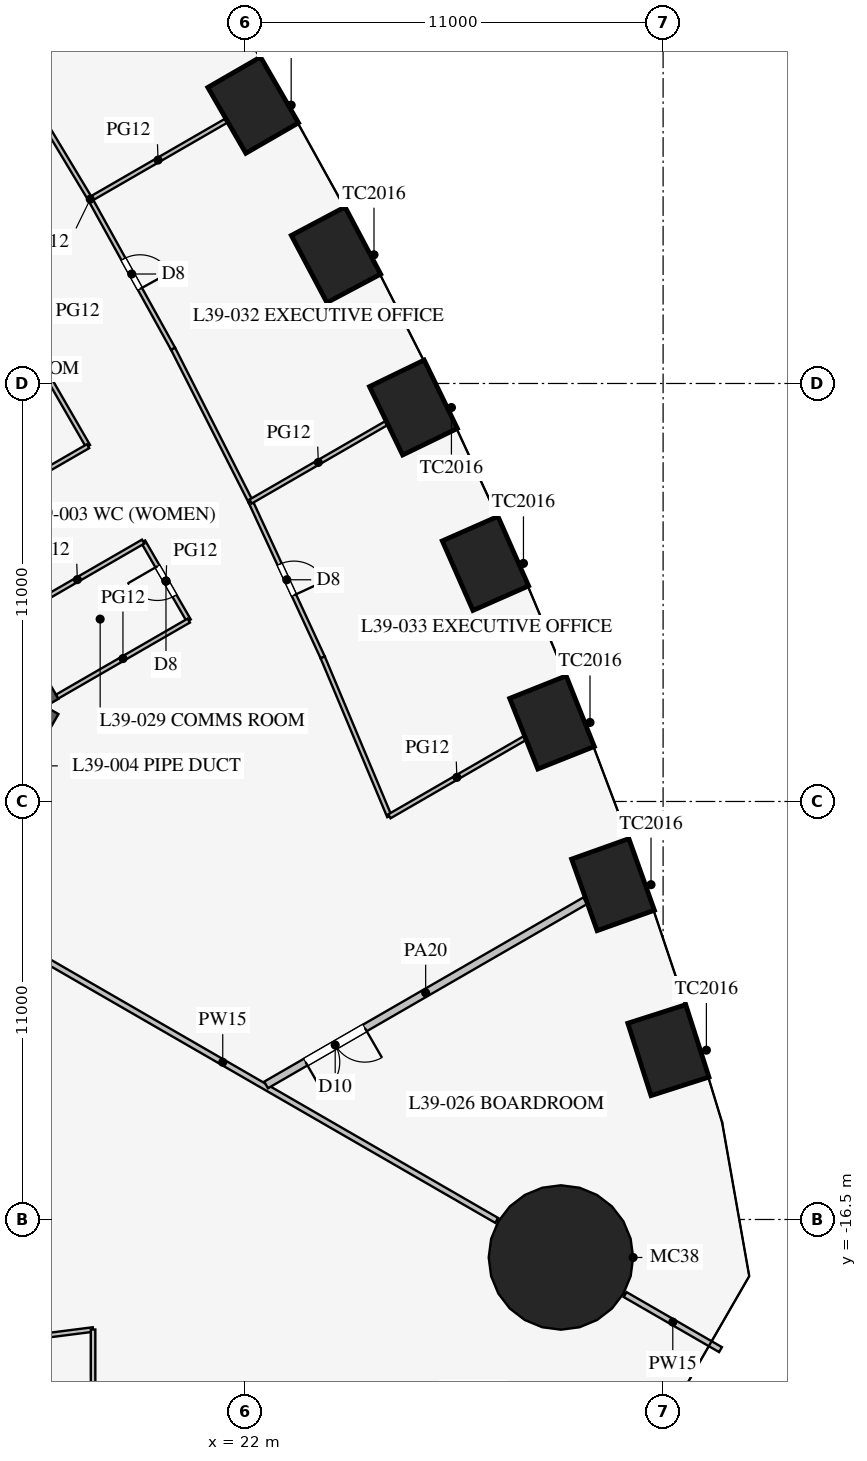
"""IFC4 building model, lengths in metres.
Left out: names, types, materials, properties, quantities, classifications, styles, units other than length and angle.
Written with IfcOpenShell. Run it as: python <this file> out.ifc"""

import sys

from ifc_helpers import new_model, si_unit, direction, frame, frame_2d, origin, origin_2d, place, context, subcontext, project, spatial, rectangle, circle, extrude, element, fill, save


model = new_model("IFC4")
c1 = context("Model", 3, precision=1e-05, world=origin(), true_north=direction((0.0, 1.0)))
c2 = subcontext(c1, "Body", "Model", "MODEL_VIEW")
j1 = project(units=[si_unit("LENGTHUNIT", "METRE"), si_unit("PLANEANGLEUNIT", "RADIAN")], contexts=[c1])
p1 = place(None, origin())
s1 = spatial("IfcSite", under=j1, at=p1, CompositionType="ELEMENT")
p2 = place(p1, origin())
s2 = spatial("IfcBuilding", under=s1, at=p2, CompositionType="ELEMENT")
p3 = place(p2, frame((0.0, 0.0, 170.3)))
s3 = spatial("IfcBuildingStorey", under=s2, at=p3, CompositionType="ELEMENT", Elevation=170.3)
for number, where, z_axis, x_axis in (
    (1, (33.139, -12.044, 0.0), (0.0, 0.0, 1.0), (-0.305, 0.952, 0.0)),
    (2, (31.682, -7.689, 0.0), (0.0, 0.0, 1.0), (-0.336, 0.942, 0.0)),
    (3, (30.077, -3.42, 0.0), (0.0, 0.0, 1.0), (-0.37, 0.929, 0.0)),
    (4, (28.325, 0.765, 0.0), (0.0, 0.0, 1.0), (-0.403, 0.915, 0.0)),
    (5, (26.43, 4.867, 0.0), (0.0, 0.0, 1.0), (-0.436, 0.9, 0.0)),
    (6, (24.393, 8.887, 0.0), (0.0, 0.0, 1.0), (-0.468, 0.883, 0.0)),
    (7, (22.213, 12.825, 0.0), (0.0, 0.0, 1.0), (-0.5, 0.866, 0.0)),
):
    element("IfcColumn", number, at=place(p3, frame(where, z_axis=z_axis, x_axis=x_axis)), inside=s3, PredefinedType="COLUMN", context=c2, shape_type="SweptSolid", body=[
        extrude(rectangle(XDim=2.0, YDim=1.6, at=origin_2d()), origin(), (0.0, 0.0, 1.0), 4.2),
    ])
p4 = place(p3, frame((30.311, -17.5, 0.0), z_axis=(0.0, 0.0, 1.0), x_axis=(1.0, 0.0, 0.0)))
e8 = element("IfcColumn", 8, at=p4, inside=s3, PredefinedType="COLUMN", context=c2, shape_type="SweptSolid", body=[
    extrude(circle(Radius=1.9, at=origin_2d()), origin(), (0.0, 0.0, 1.0), 4.2),
])
p5 = place(p3, frame((10.97, -13.0, 0.0), z_axis=(0.0, 0.0, 1.0), x_axis=(0.499995765644, 0.866027848477, 0.0)))
e9 = element("IfcWall", 9, at=p5, inside=s3, PredefinedType="SHEAR", context=c2, shape_type="SweptSolid", body=[
    extrude(rectangle(XDim=11.547, YDim=0.8, at=frame_2d((5.773, 0.0))), origin(), (0.0, 0.0, 1.0), 4.2),
])
p6 = place(p3, frame((16.743, -3.0, 0.0), z_axis=(0.0, 0.0, 1.0), x_axis=(-0.500002442456, 0.866023993627, 0.0)))
e10 = element("IfcWall", 10, at=p6, inside=s3, PredefinedType="SHEAR", context=c2, shape_type="SweptSolid", body=[
    extrude(rectangle(XDim=21.939, YDim=0.8, at=frame_2d((10.97, 0.0))), origin(), (0.0, 0.0, 1.0), 4.2),
])
p7 = place(p6, frame((17.27, 0.0, 0.0)))
e11 = element("IfcOpeningElement", 11, at=p7, cuts=e10, PredefinedType="OPENING", context=c2, shape_type="SweptSolid", body=[
    extrude(rectangle(XDim=1.2, YDim=2.1, at=frame_2d((0.6, 1.05))), frame((0.0, 0.41, 0.0), z_axis=(0.0, -1.0, 0.0), x_axis=(1.0, 0.0, 0.0)), (0.0, 0.0, 1.0), 0.82),
])
p8 = place(p6, frame((3.47, 0.0, 0.0)))
e12 = element("IfcOpeningElement", 12, at=p8, cuts=e10, PredefinedType="OPENING", context=c2, shape_type="SweptSolid", body=[
    extrude(rectangle(XDim=1.2, YDim=2.1, at=frame_2d((0.6, 1.05))), frame((0.0, 0.41, 0.0), z_axis=(0.0, -1.0, 0.0), x_axis=(1.0, 0.0, 0.0)), (0.0, 0.0, 1.0), 0.82),
])
p9 = place(p3, frame((14.203, -8.2, 0.0), z_axis=(0.0, 0.0, 1.0), x_axis=(0.866024668836, -0.500001272966, 0.0)))
e13 = element("IfcWall", 13, at=p9, inside=s3, PredefinedType="PARTITIONING", context=c2, shape_type="SweptSolid", body=[
    extrude(rectangle(XDim=16.65, YDim=0.15, at=frame_2d((8.325, 0.0))), origin(), (0.0, 0.0, 1.0), 2.3),
])
p10 = place(p3, frame((32.0, -18.475, 0.0), z_axis=(0.0, 0.0, 1.0), x_axis=(0.866042548026, -0.499970304126, 0.0)))
e14 = element("IfcWall", 14, at=p10, inside=s3, PredefinedType="PARTITIONING", context=c2, shape_type="SweptSolid", body=[
    extrude(rectangle(XDim=2.899, YDim=0.15, at=frame_2d((1.45, 0.0))), origin(), (0.0, 0.0, 1.0), 2.3),
])
p11 = place(p3, frame((13.5, -19.968, 0.0), z_axis=(0.0, 0.0, 1.0), x_axis=(0.992010652594, 0.12615413247, 0.0)))
e15 = element("IfcWall", 15, at=p11, inside=s3, PredefinedType="PARTITIONING", context=c2, shape_type="SweptSolid", body=[
    extrude(rectangle(XDim=4.536, YDim=0.12, at=frame_2d((2.268, 0.0))), origin(), (0.0, 0.0, 1.0), 2.9),
])
p12 = place(p11, frame((1.8, 0.0, 0.15)))
e16 = element("IfcOpeningElement", 16, at=p12, cuts=e15, PredefinedType="OPENING", context=c2, shape_type="SweptSolid", body=[
    extrude(rectangle(XDim=0.9, YDim=2.1, at=frame_2d((0.45, 1.05))), frame((0.0, 0.07, 0.0), z_axis=(0.0, -1.0, 0.0), x_axis=(1.0, 0.0, 0.0)), (0.0, 0.0, 1.0), 0.14),
])
p13 = place(p3, frame((18.0, -19.396, 0.0), z_axis=(0.0, 0.0, 1.0), x_axis=(0.0, -1.0, 0.0)))
e17 = element("IfcWall", 17, at=p13, inside=s3, PredefinedType="PARTITIONING", context=c2, shape_type="SweptSolid", body=[
    extrude(rectangle(XDim=4.103, YDim=0.12, at=frame_2d((2.052, 0.0))), origin(), (0.0, 0.0, 1.0), 2.4),
])
p14 = place(p3, frame((20.519, -0.74, 0.0), z_axis=(0.0, 0.0, 1.0), x_axis=(-0.499957262057, 0.866050077142, 0.0)))
e18 = element("IfcWall", 18, at=p14, inside=s3, PredefinedType="PARTITIONING", context=c2, shape_type="SweptSolid", body=[
    extrude(rectangle(XDim=2.4, YDim=0.12, at=frame_2d((1.2, 0.0))), origin(), (0.0, 0.0, 1.0), 2.9),
])
p15 = place(p14, frame((0.75, 0.0, 0.15)))
e19 = element("IfcOpeningElement", 19, at=p15, cuts=e18, PredefinedType="OPENING", context=c2, shape_type="SweptSolid", body=[
    extrude(rectangle(XDim=0.9, YDim=2.1, at=frame_2d((0.45, 1.05))), frame((0.0, 0.07, 0.0), z_axis=(0.0, -1.0, 0.0), x_axis=(1.0, 0.0, 0.0)), (0.0, 0.0, 1.0), 0.14),
])
p16 = place(p3, frame((17.869, 3.85, 0.0), z_axis=(0.0, 0.0, 1.0), x_axis=(-0.500016814911, 0.866015695474, 0.0)))
e20 = element("IfcWall", 20, at=p16, inside=s3, PredefinedType="PARTITIONING", context=c2, shape_type="SweptSolid", body=[
    extrude(rectangle(XDim=5.6, YDim=0.12, at=frame_2d((2.8, 0.0))), origin(), (0.0, 0.0, 1.0), 2.9),
])
p17 = place(p16, frame((2.3, 0.0, 0.15)))
e21 = element("IfcOpeningElement", 21, at=p17, cuts=e20, PredefinedType="OPENING", context=c2, shape_type="SweptSolid", body=[
    extrude(rectangle(XDim=1.0, YDim=2.1, at=frame_2d((0.5, 1.05))), frame((0.0, 0.07, 0.0), z_axis=(0.0, -1.0, 0.0), x_axis=(1.0, 0.0, 0.0)), (0.0, 0.0, 1.0), 0.14),
])
for number, where, z_axis, x_axis in (
    (22, (17.055, -2.74, 0.0), (0.0, 0.0, 1.0), (0.866, 0.5, 0.0)),
    (23, (14.405, 1.85, 0.0), (0.0, 0.0, 1.0), (0.866, 0.5, 0.0)),
    (24, (15.855, -0.661, 0.0), (0.0, 0.0, 1.0), (0.866, 0.5, 0.0)),
):
    element("IfcWall", number, at=place(p3, frame(where, z_axis=z_axis, x_axis=x_axis)), inside=s3, PredefinedType="PARTITIONING", context=c2, shape_type="SweptSolid", body=[
        extrude(rectangle(XDim=4.0, YDim=0.12, at=frame_2d((2.0, 0.0))), origin(), (0.0, 0.0, 1.0), 2.9),
    ])
p18 = place(p3, frame((17.927, 10.35, 0.0), z_axis=(0.0, 0.0, 1.0), x_axis=(-0.515548366618, 0.856860479703, 0.0)))
e25 = element("IfcWall", 25, at=p18, inside=s3, PredefinedType="PARTITIONING", context=c2, shape_type="SweptSolid", body=[
    extrude(rectangle(XDim=4.501, YDim=0.12, at=frame_2d((2.25, 0.0))), origin(), (0.0, 0.0, 1.0), 2.9),
])
p19 = place(p3, frame((24.043, -1.708, 0.0), z_axis=(0.0, 0.0, 1.0), x_axis=(-0.41992827805, 0.90755729367, 0.0)))
e26 = element("IfcWall", 26, at=p19, inside=s3, PredefinedType="PARTITIONING", context=c2, shape_type="SweptSolid", body=[
    extrude(rectangle(XDim=4.519, YDim=0.12, at=frame_2d((2.259, 0.0))), origin(), (0.0, 0.0, 1.0), 2.9),
])
p20 = place(p19, frame((1.8, 0.0, 0.15)))
e27 = element("IfcOpeningElement", 27, at=p20, cuts=e26, PredefinedType="OPENING", context=c2, shape_type="SweptSolid", body=[
    extrude(rectangle(XDim=0.9, YDim=2.1, at=frame_2d((0.45, 1.05))), frame((0.0, 0.07, 0.0), z_axis=(0.0, -1.0, 0.0), x_axis=(1.0, 0.0, 0.0)), (0.0, 0.0, 1.0), 0.14),
])
p21 = place(p3, frame((25.797, -5.891, 0.0), z_axis=(0.0, 0.0, 1.0), x_axis=(-0.386762112496, 0.922179520667, 0.0)))
e28 = element("IfcWall", 28, at=p21, inside=s3, PredefinedType="PARTITIONING", context=c2, shape_type="SweptSolid", body=[
    extrude(rectangle(XDim=4.536, YDim=0.12, at=frame_2d((2.268, 0.0))), origin(), (0.0, 0.0, 1.0), 2.9),
])
p22 = place(p3, frame((20.106, 6.412, 0.0), z_axis=(0.0, 0.0, 1.0), x_axis=(-0.484292898211, 0.874905931368, 0.0)))
e29 = element("IfcWall", 29, at=p22, inside=s3, PredefinedType="PARTITIONING", context=c2, shape_type="SweptSolid", body=[
    extrude(rectangle(XDim=4.501, YDim=0.12, at=frame_2d((2.25, 0.0))), origin(), (0.0, 0.0, 1.0), 2.9),
])
p23 = place(p22, frame((1.8, 0.0, 0.15)))
e30 = element("IfcOpeningElement", 30, at=p23, cuts=e29, PredefinedType="OPENING", context=c2, shape_type="SweptSolid", body=[
    extrude(rectangle(XDim=0.9, YDim=2.1, at=frame_2d((0.45, 1.05))), frame((0.0, 0.07, 0.0), z_axis=(0.0, -1.0, 0.0), x_axis=(1.0, 0.0, 0.0)), (0.0, 0.0, 1.0), 0.14),
])
p24 = place(p3, frame((22.145, 2.393, 0.0), z_axis=(0.0, 0.0, 1.0), x_axis=(-0.452471679136, 0.891778772779, 0.0)))
e31 = element("IfcWall", 31, at=p24, inside=s3, PredefinedType="PARTITIONING", context=c2, shape_type="SweptSolid", body=[
    extrude(rectangle(XDim=4.507, YDim=0.12, at=frame_2d((2.253, 0.0))), origin(), (0.0, 0.0, 1.0), 2.9),
])
p25 = place(p3, frame((17.927, 10.35, 0.0), z_axis=(0.0, 0.0, 1.0), x_axis=(0.866009926209, 0.50002680699, 0.0)))
e32 = element("IfcWall", 32, at=p25, inside=s3, PredefinedType="PARTITIONING", context=c2, shape_type="SweptSolid", body=[
    extrude(rectangle(XDim=4.12, YDim=0.12, at=frame_2d((2.06, 0.0))), origin(), (0.0, 0.0, 1.0), 2.6),
])
p26 = place(p3, frame((25.797, -5.891, 0.0), z_axis=(0.0, 0.0, 1.0), x_axis=(0.866019112135, 0.500010897298, 0.0)))
e33 = element("IfcWall", 33, at=p26, inside=s3, PredefinedType="PARTITIONING", context=c2, shape_type="SweptSolid", body=[
    extrude(rectangle(XDim=4.103, YDim=0.12, at=frame_2d((2.052, 0.0))), origin(), (0.0, 0.0, 1.0), 2.4),
])
p27 = place(p3, frame((22.553, -12.96, 0.0), z_axis=(0.0, 0.0, 1.0), x_axis=(0.866028367999, 0.499994865794, 0.0)))
e34 = element("IfcWall", 34, at=p27, inside=s3, PredefinedType="PARTITIONING", context=c2, shape_type="SweptSolid", body=[
    extrude(rectangle(XDim=9.697, YDim=0.2, at=frame_2d((4.849, 0.0))), origin(), (0.0, 0.0, 1.0), 2.8),
])
p28 = place(p27, frame((1.2, 0.0, 0.15)))
e35 = element("IfcOpeningElement", 35, at=p28, cuts=e34, PredefinedType="OPENING", context=c2, shape_type="SweptSolid", body=[
    extrude(rectangle(XDim=1.8, YDim=2.1, at=frame_2d((0.9, 1.05))), frame((0.0, 0.11, 0.0), z_axis=(0.0, -1.0, 0.0), x_axis=(1.0, 0.0, 0.0)), (0.0, 0.0, 1.0), 0.22),
])
p29 = place(p3, frame((22.145, 2.393, 0.0), z_axis=(0.0, 0.0, 1.0), x_axis=(0.866018637367, 0.500011719595, 0.0)))
e36 = element("IfcWall", 36, at=p29, inside=s3, PredefinedType="PARTITIONING", context=c2, shape_type="SweptSolid", body=[
    extrude(rectangle(XDim=4.116, YDim=0.12, at=frame_2d((2.058, 0.0))), origin(), (0.0, 0.0, 1.0), 2.6),
])
p30 = place(p28, frame((1.8, 0.0, 0.0), z_axis=(0.0, 0.0, 1.0), x_axis=(-1.0, 0.0, 0.0)))
e37 = element("IfcDoor", 37, at=p30, inside=s3, OperationType="DOUBLE_DOOR_SINGLE_SWING", PredefinedType="DOOR", context=c2, shape_type="SweptSolid", body=[
    extrude(rectangle(XDim=1.8, YDim=2.1, at=frame_2d((0.9, 1.05))), frame((0.0, 0.025, 0.0), z_axis=(0.0, -1.0, 0.0), x_axis=(1.0, 0.0, 0.0)), (0.0, 0.0, 1.0), 0.05),
])
fill(e35, e37)
p31 = place(p15, origin())
e38 = element("IfcDoor", 38, at=p31, inside=s3, OperationType="SINGLE_SWING_RIGHT", PredefinedType="DOOR", context=c2, shape_type="SweptSolid", body=[
    extrude(rectangle(XDim=0.9, YDim=2.1, at=frame_2d((0.45, 1.05))), frame((0.0, 0.025, 0.0), z_axis=(0.0, -1.0, 0.0), x_axis=(1.0, 0.0, 0.0)), (0.0, 0.0, 1.0), 0.05),
])
fill(e19, e38)
p32 = place(p23, frame((0.9, 0.0, 0.0), z_axis=(0.0, 0.0, 1.0), x_axis=(-1.0, 0.0, 0.0)))
e39 = element("IfcDoor", 39, at=p32, inside=s3, OperationType="SINGLE_SWING_RIGHT", PredefinedType="DOOR", context=c2, shape_type="SweptSolid", body=[
    extrude(rectangle(XDim=0.9, YDim=2.1, at=frame_2d((0.45, 1.05))), frame((0.0, 0.025, 0.0), z_axis=(0.0, -1.0, 0.0), x_axis=(1.0, 0.0, 0.0)), (0.0, 0.0, 1.0), 0.05),
])
fill(e30, e39)
p33 = place(p20, frame((0.9, 0.0, 0.0), z_axis=(0.0, 0.0, 1.0), x_axis=(-1.0, 0.0, 0.0)))
e40 = element("IfcDoor", 40, at=p33, inside=s3, OperationType="SINGLE_SWING_RIGHT", PredefinedType="DOOR", context=c2, shape_type="SweptSolid", body=[
    extrude(rectangle(XDim=0.9, YDim=2.1, at=frame_2d((0.45, 1.05))), frame((0.0, 0.025, 0.0), z_axis=(0.0, -1.0, 0.0), x_axis=(1.0, 0.0, 0.0)), (0.0, 0.0, 1.0), 0.05),
])
fill(e27, e40)
save(model, sys.argv[1])
